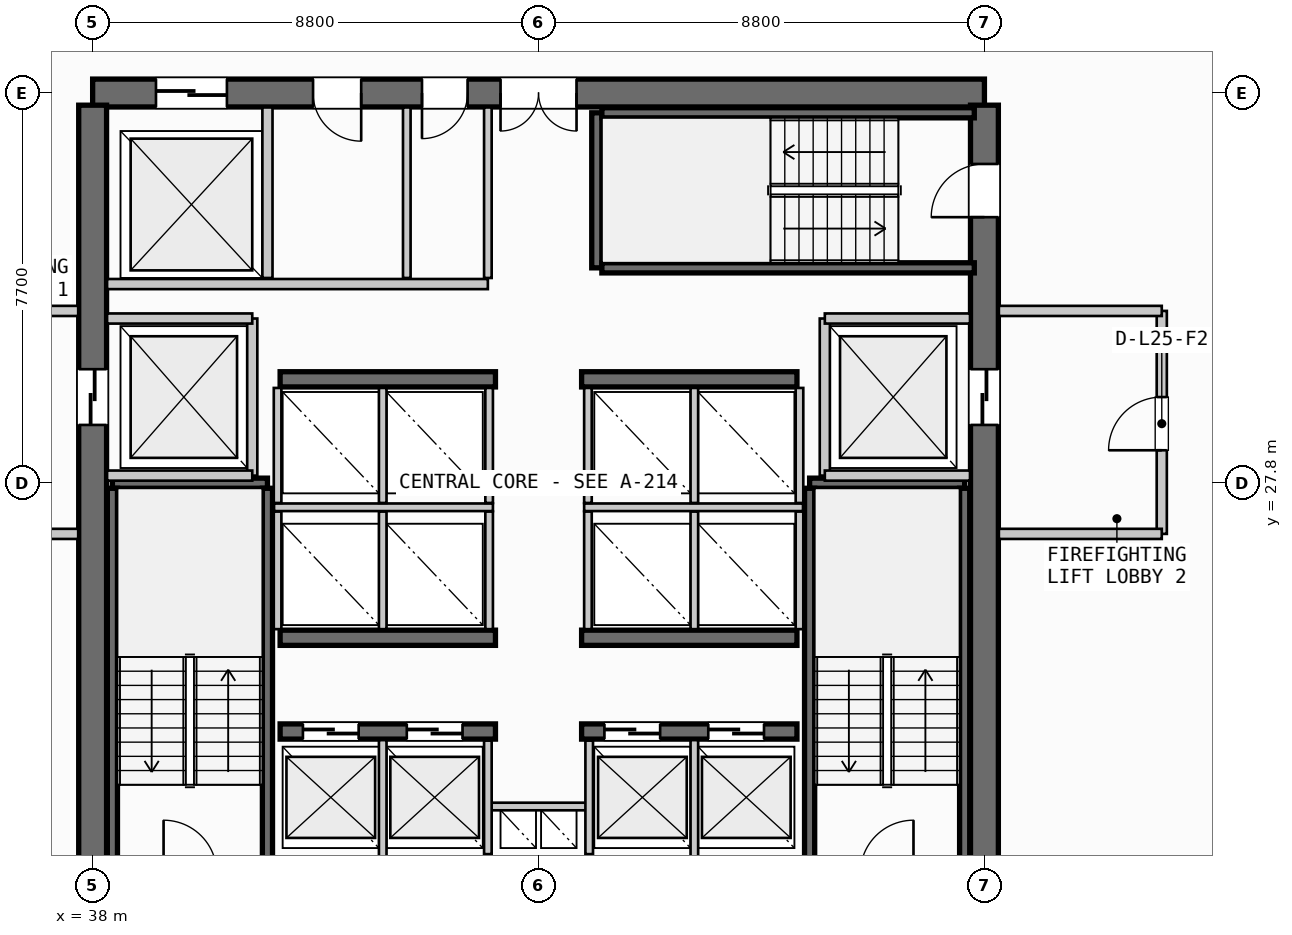
"""IFC4 building model, lengths in metres.
Left out: names, types, materials, properties, quantities, classifications, styles, units other than length and angle.
Written with IfcOpenShell. Run it as: python <this file> out.ifc"""

import sys

from ifc_helpers import new_model, si_unit, direction, frame, frame_2d, origin, place, context, subcontext, project, spatial, rectangle, extrude, source, transform, mapped, element, fill, save


model = new_model("IFC4")
c1 = context("Model", 3, precision=1e-05, world=origin(), true_north=direction((0.0, 1.0)))
c2 = subcontext(c1, "Body", "Model", "MODEL_VIEW")
j1 = project(units=[si_unit("LENGTHUNIT", "METRE"), si_unit("PLANEANGLEUNIT", "RADIAN")], contexts=[c1])
p1 = place(None, origin())
s1 = spatial("IfcSite", under=j1, at=p1, CompositionType="ELEMENT")
p2 = place(p1, origin())
s2 = spatial("IfcBuilding", under=s1, at=p2, CompositionType="ELEMENT")
p3 = place(p2, frame((0.0, 0.0, 103.6)))
s3 = spatial("IfcBuildingStorey", under=s2, at=p3, CompositionType="ELEMENT", Elevation=103.6)
p4 = place(p3, frame((55.6, 35.5, 0.0), z_axis=(0.0, 0.0, 1.0), x_axis=(-1.0, 0.0, 0.0)))
e1 = element("IfcWall", 1, at=p4, inside=s3, PredefinedType="SHEAR", context=c2, shape_type="SweptSolid", body=[
    extrude(rectangle(XDim=17.6, YDim=0.55, at=frame_2d((8.8, 0.0))), origin(), (0.0, 0.0, 1.0), 3.35),
])
p5 = place(p4, frame((8.05, 0.0, 0.0)))
e2 = element("IfcOpeningElement", 2, at=p5, cuts=e1, PredefinedType="OPENING", context=c2, shape_type="SweptSolid", body=[
    extrude(rectangle(XDim=1.5, YDim=2.2, at=frame_2d((0.75, 1.1))), frame((0.0, 0.285, 0.0), z_axis=(0.0, -1.0, 0.0), x_axis=(1.0, 0.0, 0.0)), (0.0, 0.0, 1.0), 0.57),
])
p6 = place(p4, frame((14.95, 0.0, 0.0)))
e3 = element("IfcOpeningElement", 3, at=p6, cuts=e1, PredefinedType="OPENING", context=c2, shape_type="SweptSolid", body=[
    extrude(rectangle(XDim=1.4, YDim=2.3, at=frame_2d((0.7, 1.15))), frame((0.0, 0.285, 0.0), z_axis=(0.0, -1.0, 0.0), x_axis=(1.0, 0.0, 0.0)), (0.0, 0.0, 1.0), 0.57),
])
p7 = place(p4, frame((12.3, 0.0, 0.0)))
e4 = element("IfcOpeningElement", 4, at=p7, cuts=e1, PredefinedType="OPENING", context=c2, shape_type="SweptSolid", body=[
    extrude(rectangle(XDim=0.95, YDim=2.15, at=frame_2d((0.475, 1.075))), frame((0.0, 0.285, 0.0), z_axis=(0.0, -1.0, 0.0), x_axis=(1.0, 0.0, 0.0)), (0.0, 0.0, 1.0), 0.57),
])
p8 = place(p4, frame((10.2, 0.0, 0.0)))
e5 = element("IfcOpeningElement", 5, at=p8, cuts=e1, PredefinedType="OPENING", context=c2, shape_type="SweptSolid", body=[
    extrude(rectangle(XDim=0.9, YDim=2.15, at=frame_2d((0.45, 1.075))), frame((0.0, 0.285, 0.0), z_axis=(0.0, -1.0, 0.0), x_axis=(1.0, 0.0, 0.0)), (0.0, 0.0, 1.0), 0.57),
])
p9 = place(p3, frame((38.0, 35.26, 0.0), z_axis=(0.0, 0.0, 1.0), x_axis=(0.0, -1.0, 0.0)))
e6 = element("IfcWall", 6, at=p9, inside=s3, PredefinedType="SHEAR", context=c2, shape_type="SweptSolid", body=[
    extrude(rectangle(XDim=14.92, YDim=0.55, at=frame_2d((7.46, 0.0))), origin(), (0.0, 0.0, 1.0), 3.35),
])
p10 = place(p9, frame((5.21, 0.0, 0.0)))
e7 = element("IfcOpeningElement", 7, at=p10, cuts=e6, PredefinedType="OPENING", context=c2, shape_type="SweptSolid", body=[
    extrude(rectangle(XDim=1.1, YDim=2.2, at=frame_2d((0.55, 1.1))), frame((0.0, 0.285, 0.0), z_axis=(0.0, -1.0, 0.0), x_axis=(1.0, 0.0, 0.0)), (0.0, 0.0, 1.0), 0.57),
])
p11 = place(p3, frame((55.6, 20.34, 0.0), z_axis=(0.0, 0.0, 1.0), x_axis=(0.0, 1.0, 0.0)))
e8 = element("IfcWall", 8, at=p11, inside=s3, PredefinedType="SHEAR", context=c2, shape_type="SweptSolid", body=[
    extrude(rectangle(XDim=14.92, YDim=0.55, at=frame_2d((7.46, 0.0))), origin(), (0.0, 0.0, 1.0), 3.35),
])
p12 = place(p11, frame((12.71, 0.0, 0.0)))
e9 = element("IfcOpeningElement", 9, at=p12, cuts=e8, PredefinedType="OPENING", context=c2, shape_type="SweptSolid", body=[
    extrude(rectangle(XDim=1.05, YDim=2.15, at=frame_2d((0.525, 1.075))), frame((0.0, 0.285, 0.0), z_axis=(0.0, -1.0, 0.0), x_axis=(1.0, 0.0, 0.0)), (0.0, 0.0, 1.0), 0.57),
])
p13 = place(p11, frame((8.61, 0.0, 0.0)))
e10 = element("IfcOpeningElement", 10, at=p13, cuts=e8, PredefinedType="OPENING", context=c2, shape_type="SweptSolid", body=[
    extrude(rectangle(XDim=1.1, YDim=2.2, at=frame_2d((0.55, 1.1))), frame((0.0, 0.285, 0.0), z_axis=(0.0, -1.0, 0.0), x_axis=(1.0, 0.0, 0.0)), (0.0, 0.0, 1.0), 0.57),
])
p14 = place(p3, frame((41.7, 22.9, 0.0), z_axis=(0.0, 0.0, 1.0), x_axis=(1.0, 0.0, 0.0)))
e11 = element("IfcWall", 11, at=p14, inside=s3, PredefinedType="SHEAR", context=c2, shape_type="SweptSolid", body=[
    extrude(rectangle(XDim=4.25, YDim=0.3, at=frame_2d((2.125, 0.0))), origin(), (0.0, 0.0, 1.0), 3.35),
])
p15 = place(p14, frame((0.45, 0.0, 0.0)))
e12 = element("IfcOpeningElement", 12, at=p15, cuts=e11, PredefinedType="OPENING", context=c2, shape_type="SweptSolid", body=[
    extrude(rectangle(XDim=1.1, YDim=2.2, at=frame_2d((0.55, 1.1))), frame((0.0, 0.16, 0.0), z_axis=(0.0, -1.0, 0.0), x_axis=(1.0, 0.0, 0.0)), (0.0, 0.0, 1.0), 0.32),
])
p16 = place(p14, frame((2.5, 0.0, 0.0)))
e13 = element("IfcOpeningElement", 13, at=p16, cuts=e11, PredefinedType="OPENING", context=c2, shape_type="SweptSolid", body=[
    extrude(rectangle(XDim=1.1, YDim=2.2, at=frame_2d((0.55, 1.1))), frame((0.0, 0.16, 0.0), z_axis=(0.0, -1.0, 0.0), x_axis=(1.0, 0.0, 0.0)), (0.0, 0.0, 1.0), 0.32),
])
p17 = place(p3, frame((47.65, 22.9, 0.0), z_axis=(0.0, 0.0, 1.0), x_axis=(1.0, 0.0, 0.0)))
e14 = element("IfcWall", 14, at=p17, inside=s3, PredefinedType="SHEAR", context=c2, shape_type="SweptSolid", body=[
    extrude(rectangle(XDim=4.25, YDim=0.3, at=frame_2d((2.125, 0.0))), origin(), (0.0, 0.0, 1.0), 3.35),
])
p18 = place(p17, frame((0.45, 0.0, 0.0)))
e15 = element("IfcOpeningElement", 15, at=p18, cuts=e14, PredefinedType="OPENING", context=c2, shape_type="SweptSolid", body=[
    extrude(rectangle(XDim=1.1, YDim=2.2, at=frame_2d((0.55, 1.1))), frame((0.0, 0.16, 0.0), z_axis=(0.0, -1.0, 0.0), x_axis=(1.0, 0.0, 0.0)), (0.0, 0.0, 1.0), 0.32),
])
p19 = place(p17, frame((2.5, 0.0, 0.0)))
e16 = element("IfcOpeningElement", 16, at=p19, cuts=e14, PredefinedType="OPENING", context=c2, shape_type="SweptSolid", body=[
    extrude(rectangle(XDim=1.1, YDim=2.2, at=frame_2d((0.55, 1.1))), frame((0.0, 0.16, 0.0), z_axis=(0.0, -1.0, 0.0), x_axis=(1.0, 0.0, 0.0)), (0.0, 0.0, 1.0), 0.32),
])
for number, where, z_axis, x_axis in (
    (17, (41.7, 24.75, 0.0), (0.0, 0.0, 1.0), (1.0, 0.0, 0.0)),
    (18, (47.65, 24.75, 0.0), (0.0, 0.0, 1.0), (1.0, 0.0, 0.0)),
    (19, (41.7, 29.85, 0.0), (0.0, 0.0, 1.0), (1.0, 0.0, 0.0)),
    (20, (47.65, 29.85, 0.0), (0.0, 0.0, 1.0), (1.0, 0.0, 0.0)),
):
    element("IfcWall", number, at=place(p3, frame(where, z_axis=z_axis, x_axis=x_axis)), inside=s3, PredefinedType="SHEAR", context=c2, shape_type="SweptSolid", body=[
        extrude(rectangle(XDim=4.25, YDim=0.3, at=frame_2d((2.125, 0.0))), origin(), (0.0, 0.0, 1.0), 3.35),
    ])
p20 = place(p3, frame((38.39, 27.8, 0.0), z_axis=(0.0, 0.0, 1.0), x_axis=(1.0, 0.0, 0.0)))
e21 = element("IfcWall", 21, at=p20, inside=s3, PredefinedType="SHEAR", context=c2, shape_type="SweptSolid", body=[
    extrude(rectangle(XDim=3.06, YDim=0.2, at=frame_2d((1.53, 0.0))), origin(), (0.0, 0.0, 1.0), 3.35),
])
for number, where, z_axis, x_axis in (
    (22, (41.45, 27.7, 0.0), (0.0, 0.0, 1.0), (0.0, -1.0, 0.0)),
    (23, (38.39, 20.35, 0.0), (0.0, 0.0, 1.0), (0.0, 1.0, 0.0)),
):
    element("IfcWall", number, at=place(p3, frame(where, z_axis=z_axis, x_axis=x_axis)), inside=s3, PredefinedType="SHEAR", context=c2, shape_type="SweptSolid", body=[
        extrude(rectangle(XDim=7.35, YDim=0.2, at=frame_2d((3.675, 0.0))), origin(), (0.0, 0.0, 1.0), 3.35),
    ])
p21 = place(p3, frame((52.15, 27.8, 0.0), z_axis=(0.0, 0.0, 1.0), x_axis=(1.0, 0.0, 0.0)))
e24 = element("IfcWall", 24, at=p21, inside=s3, PredefinedType="SHEAR", context=c2, shape_type="SweptSolid", body=[
    extrude(rectangle(XDim=3.06, YDim=0.2, at=frame_2d((1.53, 0.0))), origin(), (0.0, 0.0, 1.0), 3.35),
])
for number, where, z_axis, x_axis in (
    (25, (55.21, 27.7, 0.0), (0.0, 0.0, 1.0), (0.0, -1.0, 0.0)),
    (26, (52.15, 20.35, 0.0), (0.0, 0.0, 1.0), (0.0, 1.0, 0.0)),
):
    element("IfcWall", number, at=place(p3, frame(where, z_axis=z_axis, x_axis=x_axis)), inside=s3, PredefinedType="SHEAR", context=c2, shape_type="SweptSolid", body=[
        extrude(rectangle(XDim=7.35, YDim=0.2, at=frame_2d((3.675, 0.0))), origin(), (0.0, 0.0, 1.0), 3.35),
    ])
p22 = place(p3, frame((47.95, 32.05, 0.0), z_axis=(0.0, 0.0, 1.0), x_axis=(0.0, 1.0, 0.0)))
e27 = element("IfcWall", 27, at=p22, inside=s3, PredefinedType="SHEAR", context=c2, shape_type="SweptSolid", body=[
    extrude(rectangle(XDim=3.06, YDim=0.2, at=frame_2d((1.53, 0.0))), origin(), (0.0, 0.0, 1.0), 3.35),
])
for number, where, z_axis, x_axis in (
    (28, (48.05, 35.11, 0.0), (0.0, 0.0, 1.0), (1.0, 0.0, 0.0)),
    (29, (55.4, 32.05, 0.0), (0.0, 0.0, 1.0), (-1.0, 0.0, 0.0)),
):
    element("IfcWall", number, at=place(p3, frame(where, z_axis=z_axis, x_axis=x_axis)), inside=s3, PredefinedType="SHEAR", context=c2, shape_type="SweptSolid", body=[
        extrude(rectangle(XDim=7.35, YDim=0.2, at=frame_2d((3.675, 0.0))), origin(), (0.0, 0.0, 1.0), 3.35),
    ])
p23 = place(p3, frame((45.8, 21.42, 0.0), z_axis=(0.0, 0.0, 1.0), x_axis=(1.0, 0.0, 0.0)))
e30 = element("IfcWall", 30, at=p23, inside=s3, PredefinedType="PARTITIONING", context=c2, shape_type="SweptSolid", body=[
    extrude(rectangle(XDim=2.0, YDim=0.15, at=frame_2d((1.0, 0.0))), origin(), (0.0, 0.0, 1.0), 2.28),
])
for number, where, z_axis, x_axis in (
    (31, (45.8, 20.48, 0.0), (0.0, 0.0, 1.0), (0.0, 1.0, 0.0)),
    (32, (47.8, 20.48, 0.0), (0.0, 0.0, 1.0), (0.0, 1.0, 0.0)),
):
    element("IfcWall", number, at=place(p3, frame(where, z_axis=z_axis, x_axis=x_axis)), inside=s3, PredefinedType="PARTITIONING", context=c2, shape_type="SweptSolid", body=[
        extrude(rectangle(XDim=2.24, YDim=0.15, at=frame_2d((1.12, 0.0))), origin(), (0.0, 0.0, 1.0), 2.28),
    ])
p24 = place(p3, frame((41.15, 27.95, 0.0), z_axis=(0.0, 0.0, 1.0), x_axis=(0.0, 1.0, 0.0)))
e33 = element("IfcWall", 33, at=p24, inside=s3, PredefinedType="PARTITIONING", context=c2, shape_type="SweptSolid", body=[
    extrude(rectangle(XDim=3.1, YDim=0.2, at=frame_2d((1.55, 0.0))), origin(), (0.0, 0.0, 1.0), 2.28),
])
for number, where, z_axis, x_axis in (
    (34, (38.285, 27.95, 0.0), (0.0, 0.0, 1.0), (1.0, 0.0, 0.0)),
    (35, (38.285, 31.05, 0.0), (0.0, 0.0, 1.0), (1.0, 0.0, 0.0)),
):
    element("IfcWall", number, at=place(p3, frame(where, z_axis=z_axis, x_axis=x_axis)), inside=s3, PredefinedType="PARTITIONING", context=c2, shape_type="SweptSolid", body=[
        extrude(rectangle(XDim=2.865, YDim=0.2, at=frame_2d((1.433, 0.0))), origin(), (0.0, 0.0, 1.0), 2.28),
    ])
for number, where, z_axis, x_axis in (
    (36, (34.5, 26.8, 0.0), (0.0, 0.0, 1.0), (1.0, 0.0, 0.0)),
    (37, (34.5, 31.2, 0.0), (0.0, 0.0, 1.0), (1.0, 0.0, 0.0)),
):
    element("IfcWall", number, at=place(p3, frame(where, z_axis=z_axis, x_axis=x_axis)), inside=s3, PredefinedType="PARTITIONING", context=c2, shape_type="SweptSolid", body=[
        extrude(rectangle(XDim=3.215, YDim=0.2, at=frame_2d((1.607, 0.0))), origin(), (0.0, 0.0, 1.0), 2.28),
    ])
p25 = place(p3, frame((52.45, 27.95, 0.0), z_axis=(0.0, 0.0, 1.0), x_axis=(0.0, 1.0, 0.0)))
e38 = element("IfcWall", 38, at=p25, inside=s3, PredefinedType="PARTITIONING", context=c2, shape_type="SweptSolid", body=[
    extrude(rectangle(XDim=3.1, YDim=0.2, at=frame_2d((1.55, 0.0))), origin(), (0.0, 0.0, 1.0), 2.28),
])
for number, where, z_axis, x_axis in (
    (39, (52.45, 27.95, 0.0), (0.0, 0.0, 1.0), (1.0, 0.0, 0.0)),
    (40, (52.45, 31.05, 0.0), (0.0, 0.0, 1.0), (1.0, 0.0, 0.0)),
):
    element("IfcWall", number, at=place(p3, frame(where, z_axis=z_axis, x_axis=x_axis)), inside=s3, PredefinedType="PARTITIONING", context=c2, shape_type="SweptSolid", body=[
        extrude(rectangle(XDim=2.865, YDim=0.2, at=frame_2d((1.433, 0.0))), origin(), (0.0, 0.0, 1.0), 2.28),
    ])
p26 = place(p3, frame((59.1, 26.8, 0.0), z_axis=(0.0, 0.0, 1.0), x_axis=(0.0, 1.0, 0.0)))
e41 = element("IfcWall", 41, at=p26, inside=s3, PredefinedType="PARTITIONING", context=c2, shape_type="SweptSolid", body=[
    extrude(rectangle(XDim=4.4, YDim=0.2, at=frame_2d((2.2, 0.0))), origin(), (0.0, 0.0, 1.0), 2.28),
])
p27 = place(p26, frame((1.65, 0.0, 0.0)))
e42 = element("IfcOpeningElement", 42, at=p27, cuts=e41, PredefinedType="OPENING", context=c2, shape_type="SweptSolid", body=[
    extrude(rectangle(XDim=1.05, YDim=2.15, at=frame_2d((0.525, 1.075))), frame((0.0, 0.11, 0.0), z_axis=(0.0, -1.0, 0.0), x_axis=(1.0, 0.0, 0.0)), (0.0, 0.0, 1.0), 0.22),
])
for number, where, z_axis, x_axis in (
    (43, (55.885, 26.8, 0.0), (0.0, 0.0, 1.0), (1.0, 0.0, 0.0)),
    (44, (55.885, 31.2, 0.0), (0.0, 0.0, 1.0), (1.0, 0.0, 0.0)),
):
    element("IfcWall", number, at=place(p3, frame(where, z_axis=z_axis, x_axis=x_axis)), inside=s3, PredefinedType="PARTITIONING", context=c2, shape_type="SweptSolid", body=[
        extrude(rectangle(XDim=3.215, YDim=0.2, at=frame_2d((1.607, 0.0))), origin(), (0.0, 0.0, 1.0), 2.28),
    ])
for number, where, z_axis, x_axis in (
    (45, (43.725, 20.385, 0.0), (0.0, 0.0, 1.0), (0.0, 1.0, 0.0)),
    (46, (49.875, 20.385, 0.0), (0.0, 0.0, 1.0), (0.0, 1.0, 0.0)),
):
    element("IfcWall", number, at=place(p3, frame(where, z_axis=z_axis, x_axis=x_axis)), inside=s3, PredefinedType="PARTITIONING", context=c2, shape_type="SweptSolid", body=[
        extrude(rectangle(XDim=2.345, YDim=0.15, at=frame_2d((1.172, 0.0))), origin(), (0.0, 0.0, 1.0), 2.28),
    ])
p28 = place(p3, frame((41.58, 27.325, 0.0), z_axis=(0.0, 0.0, 1.0), x_axis=(1.0, 0.0, 0.0)))
e47 = element("IfcWall", 47, at=p28, inside=s3, PredefinedType="PARTITIONING", context=c2, shape_type="SweptSolid", body=[
    extrude(rectangle(XDim=4.32, YDim=0.15, at=frame_2d((2.16, 0.0))), origin(), (0.0, 0.0, 1.0), 2.28),
])
p29 = place(p3, frame((47.7, 27.325, 0.0), z_axis=(0.0, 0.0, 1.0), x_axis=(1.0, 0.0, 0.0)))
e48 = element("IfcWall", 48, at=p29, inside=s3, PredefinedType="PARTITIONING", context=c2, shape_type="SweptSolid", body=[
    extrude(rectangle(XDim=4.32, YDim=0.15, at=frame_2d((2.16, 0.0))), origin(), (0.0, 0.0, 1.0), 2.28),
])
for number, where, z_axis, x_axis in (
    (49, (41.65, 24.92, 0.0), (0.0, 0.0, 1.0), (0.0, 1.0, 0.0)),
    (50, (43.725, 24.92, 0.0), (0.0, 0.0, 1.0), (0.0, 1.0, 0.0)),
    (51, (45.825, 24.92, 0.0), (0.0, 0.0, 1.0), (0.0, 1.0, 0.0)),
    (52, (47.775, 24.92, 0.0), (0.0, 0.0, 1.0), (0.0, 1.0, 0.0)),
    (53, (49.875, 24.92, 0.0), (0.0, 0.0, 1.0), (0.0, 1.0, 0.0)),
    (54, (51.95, 24.92, 0.0), (0.0, 0.0, 1.0), (0.0, 1.0, 0.0)),
):
    element("IfcWall", number, at=place(p3, frame(where, z_axis=z_axis, x_axis=x_axis)), inside=s3, PredefinedType="PARTITIONING", context=c2, shape_type="SweptSolid", body=[
        extrude(rectangle(XDim=2.32, YDim=0.15, at=frame_2d((1.16, 0.0))), origin(), (0.0, 0.0, 1.0), 2.28),
    ])
for number, where, z_axis, x_axis in (
    (55, (41.65, 27.41, 0.0), (0.0, 0.0, 1.0), (0.0, 1.0, 0.0)),
    (56, (43.725, 27.41, 0.0), (0.0, 0.0, 1.0), (0.0, 1.0, 0.0)),
    (57, (45.825, 27.41, 0.0), (0.0, 0.0, 1.0), (0.0, 1.0, 0.0)),
    (58, (47.775, 27.41, 0.0), (0.0, 0.0, 1.0), (0.0, 1.0, 0.0)),
    (59, (49.875, 27.41, 0.0), (0.0, 0.0, 1.0), (0.0, 1.0, 0.0)),
    (60, (51.95, 27.41, 0.0), (0.0, 0.0, 1.0), (0.0, 1.0, 0.0)),
):
    element("IfcWall", number, at=place(p3, frame(where, z_axis=z_axis, x_axis=x_axis)), inside=s3, PredefinedType="PARTITIONING", context=c2, shape_type="SweptSolid", body=[
        extrude(rectangle(XDim=2.27, YDim=0.15, at=frame_2d((1.135, 0.0))), origin(), (0.0, 0.0, 1.0), 2.28),
    ])
p30 = place(p3, frame((41.45, 31.85, 0.0), z_axis=(0.0, 0.0, 1.0), x_axis=(0.0, 1.0, 0.0)))
e61 = element("IfcWall", 61, at=p30, inside=s3, PredefinedType="PARTITIONING", context=c2, shape_type="SweptSolid", body=[
    extrude(rectangle(XDim=3.365, YDim=0.2, at=frame_2d((1.683, 0.0))), origin(), (0.0, 0.0, 1.0), 2.28),
])
p31 = place(p3, frame((38.285, 31.73, 0.0), z_axis=(0.0, 0.0, 1.0), x_axis=(1.0, 0.0, 0.0)))
e62 = element("IfcWall", 62, at=p31, inside=s3, PredefinedType="PARTITIONING", context=c2, shape_type="SweptSolid", body=[
    extrude(rectangle(XDim=7.515, YDim=0.2, at=frame_2d((3.758, 0.0))), origin(), (0.0, 0.0, 1.0), 2.28),
])
p32 = place(p3, frame((45.8, 31.85, 0.0), z_axis=(0.0, 0.0, 1.0), x_axis=(0.0, 1.0, 0.0)))
e63 = element("IfcWall", 63, at=p32, inside=s3, PredefinedType="PARTITIONING", context=c2, shape_type="SweptSolid", body=[
    extrude(rectangle(XDim=3.365, YDim=0.15, at=frame_2d((1.683, 0.0))), origin(), (0.0, 0.0, 1.0), 2.28),
])
p33 = place(p3, frame((44.2, 31.85, 0.0), z_axis=(0.0, 0.0, 1.0), x_axis=(0.0, 1.0, 0.0)))
e64 = element("IfcWall", 64, at=p33, inside=s3, PredefinedType="PLUMBINGWALL", context=c2, shape_type="SweptSolid", body=[
    extrude(rectangle(XDim=3.365, YDim=0.15, at=frame_2d((1.683, 0.0))), origin(), (0.0, 0.0, 1.0), 2.28),
])
m1 = source(origin(), c2, "Body", "SweptSolid", [
    extrude(rectangle(XDim=1.05, YDim=2.15, at=frame_2d((0.525, 1.075))), frame((0.0, 0.025, 0.0), z_axis=(0.0, -1.0, 0.0), x_axis=(1.0, 0.0, 0.0)), (0.0, 0.0, 1.0), 0.05),
])
p34 = place(p12, origin())
e65 = element("IfcDoor", 65, at=p34, inside=s3, OperationType="SINGLE_SWING_LEFT", PredefinedType="DOOR", context=c2, shape_type="MappedRepresentation", body=[
    mapped(m1, transform((0.0, 0.0, 0.0), scale=1.0)),
])
fill(e9, e65)
m2 = source(origin(), c2, "Body", "SweptSolid", [
    extrude(rectangle(XDim=1.5, YDim=2.2, at=frame_2d((0.75, 1.1))), frame((0.0, 0.025, 0.0), z_axis=(0.0, -1.0, 0.0), x_axis=(1.0, 0.0, 0.0)), (0.0, 0.0, 1.0), 0.05),
])
p35 = place(p5, origin())
e66 = element("IfcDoor", 66, at=p35, inside=s3, OperationType="DOUBLE_DOOR_SINGLE_SWING", PredefinedType="DOOR", context=c2, shape_type="MappedRepresentation", body=[
    mapped(m2, transform((0.0, 0.0, 0.0), scale=1.0)),
])
fill(e2, e66)
m3 = source(origin(), c2, "Body", "SweptSolid", [
    extrude(rectangle(XDim=1.1, YDim=2.2, at=frame_2d((0.55, 1.1))), frame((0.0, 0.025, 0.0), z_axis=(0.0, -1.0, 0.0), x_axis=(1.0, 0.0, 0.0)), (0.0, 0.0, 1.0), 0.05),
])
p36 = place(p10, origin())
e67 = element("IfcDoor", 67, at=p36, inside=s3, OperationType="SLIDING_TO_LEFT", PredefinedType="DOOR", context=c2, shape_type="MappedRepresentation", body=[
    mapped(m3, transform((0.0, 0.0, 0.0), scale=1.0)),
])
fill(e7, e67)
p37 = place(p13, origin())
e68 = element("IfcDoor", 68, at=p37, inside=s3, OperationType="SLIDING_TO_RIGHT", PredefinedType="DOOR", context=c2, shape_type="MappedRepresentation", body=[
    mapped(m3, transform((0.0, 0.0, 0.0), scale=1.0)),
])
fill(e10, e68)
p38 = place(p15, origin())
e69 = element("IfcDoor", 69, at=p38, inside=s3, OperationType="SLIDING_TO_LEFT", PredefinedType="DOOR", context=c2, shape_type="MappedRepresentation", body=[
    mapped(m3, transform((0.0, 0.0, 0.0), scale=1.0)),
])
fill(e12, e69)
p39 = place(p16, origin())
e70 = element("IfcDoor", 70, at=p39, inside=s3, OperationType="SLIDING_TO_LEFT", PredefinedType="DOOR", context=c2, shape_type="MappedRepresentation", body=[
    mapped(m3, transform((0.0, 0.0, 0.0), scale=1.0)),
])
fill(e13, e70)
p40 = place(p18, origin())
e71 = element("IfcDoor", 71, at=p40, inside=s3, OperationType="SLIDING_TO_LEFT", PredefinedType="DOOR", context=c2, shape_type="MappedRepresentation", body=[
    mapped(m3, transform((0.0, 0.0, 0.0), scale=1.0)),
])
fill(e15, e71)
p41 = place(p19, origin())
e72 = element("IfcDoor", 72, at=p41, inside=s3, OperationType="SLIDING_TO_LEFT", PredefinedType="DOOR", context=c2, shape_type="MappedRepresentation", body=[
    mapped(m3, transform((0.0, 0.0, 0.0), scale=1.0)),
])
fill(e16, e72)
m4 = source(origin(), c2, "Body", "SweptSolid", [
    extrude(rectangle(XDim=1.4, YDim=2.3, at=frame_2d((0.7, 1.15))), frame((0.0, 0.025, 0.0), z_axis=(0.0, -1.0, 0.0), x_axis=(1.0, 0.0, 0.0)), (0.0, 0.0, 1.0), 0.05),
])
p42 = place(p6, origin())
e73 = element("IfcDoor", 73, at=p42, inside=s3, OperationType="SLIDING_TO_RIGHT", PredefinedType="DOOR", context=c2, shape_type="MappedRepresentation", body=[
    mapped(m4, transform((0.0, 0.0, 0.0), scale=1.0)),
])
fill(e3, e73)
m5 = source(origin(), c2, "Body", "SweptSolid", [
    extrude(rectangle(XDim=0.95, YDim=2.15, at=frame_2d((0.475, 1.075))), frame((0.0, 0.025, 0.0), z_axis=(0.0, -1.0, 0.0), x_axis=(1.0, 0.0, 0.0)), (0.0, 0.0, 1.0), 0.05),
])
p43 = place(p7, origin())
e74 = element("IfcDoor", 74, at=p43, inside=s3, OperationType="SINGLE_SWING_LEFT", PredefinedType="DOOR", context=c2, shape_type="MappedRepresentation", body=[
    mapped(m5, transform((0.0, 0.0, 0.0), scale=1.0)),
])
fill(e4, e74)
m6 = source(origin(), c2, "Body", "SweptSolid", [
    extrude(rectangle(XDim=0.9, YDim=2.15, at=frame_2d((0.45, 1.075))), frame((0.0, 0.025, 0.0), z_axis=(0.0, -1.0, 0.0), x_axis=(1.0, 0.0, 0.0)), (0.0, 0.0, 1.0), 0.05),
])
p44 = place(p8, origin())
e75 = element("IfcDoor", 75, at=p44, inside=s3, OperationType="SINGLE_SWING_RIGHT", PredefinedType="DOOR", context=c2, shape_type="MappedRepresentation", body=[
    mapped(m6, transform((0.0, 0.0, 0.0), scale=1.0)),
])
fill(e5, e75)
p45 = place(p27, origin())
e76 = element("IfcDoor", 76, at=p45, inside=s3, OperationType="SINGLE_SWING_LEFT", PredefinedType="DOOR", context=c2, shape_type="MappedRepresentation", body=[
    mapped(m1, transform((0.0, 0.0, 0.0), scale=1.0)),
])
fill(e42, e76)
save(model, sys.argv[1])
